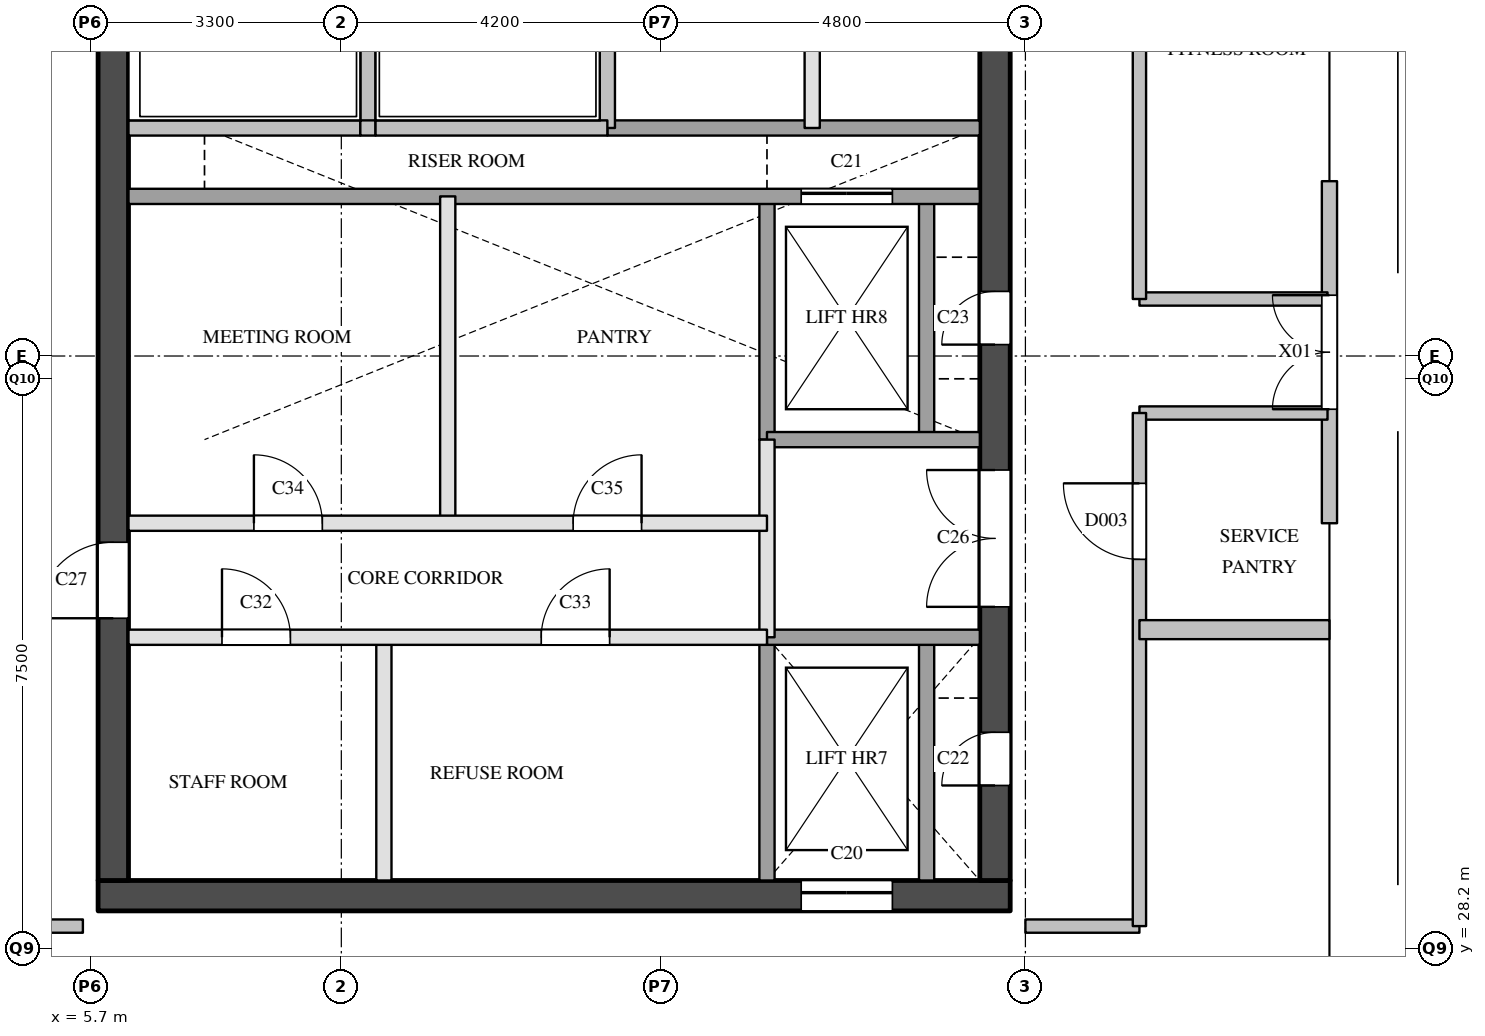
"""IFC4 building model, lengths in metres.
Left out: names, types, materials, properties, quantities, classifications, styles, units other than length and angle.
Written with IfcOpenShell. Run it as: python <this file> out.ifc"""

import sys

from ifc_helpers import new_model, si_unit, direction, frame, frame_2d, origin, place, context, subcontext, project, spatial, rectangle, extrude, element, fill, save


model = new_model("IFC4")
c1 = context("Model", 3, precision=1e-05, world=origin(), true_north=direction((0.0, 1.0)))
c2 = subcontext(c1, "Body", "Model", "MODEL_VIEW")
j1 = project(units=[si_unit("LENGTHUNIT", "METRE"), si_unit("PLANEANGLEUNIT", "RADIAN")], contexts=[c1])
p1 = place(None, origin())
s1 = spatial("IfcSite", under=j1, at=p1, CompositionType="ELEMENT")
p2 = place(p1, origin())
s2 = spatial("IfcBuilding", under=s1, at=p2, CompositionType="ELEMENT")
p3 = place(p2, frame((0.0, 0.0, 203.3)))
s3 = spatial("IfcBuildingStorey", under=s2, at=p3, CompositionType="ELEMENT", Elevation=203.3)
p4 = place(p3, frame((22.0, 33.8, 0.0), z_axis=(0.0, 0.0, 1.0), x_axis=(0.0, 1.0, 0.0)))
e1 = element("IfcWall", 1, at=p4, inside=s3, PredefinedType="SOLIDWALL", context=c2, shape_type="SweptSolid", body=[
    extrude(rectangle(XDim=4.5, YDim=0.2, at=frame_2d((2.25, 0.0))), origin(), (0.0, 0.0, 1.0), 2.6),
])
p5 = place(p4, frame((1.5, 0.0, 0.0)))
e2 = element("IfcOpeningElement", 2, at=p5, cuts=e1, PredefinedType="OPENING", context=c2, shape_type="SweptSolid", body=[
    extrude(rectangle(XDim=1.5, YDim=2.1, at=frame_2d((0.75, 1.05))), frame((0.0, 0.11, 0.0), z_axis=(0.0, -1.0, 0.0), x_axis=(1.0, 0.0, 0.0)), (0.0, 0.0, 1.0), 0.22),
])
p6 = place(p3, frame((5.8, 28.9, 0.0), z_axis=(0.0, 0.0, 1.0), x_axis=(1.0, 0.0, 0.0)))
e3 = element("IfcWall", 3, at=p6, inside=s3, PredefinedType="SHEAR", context=c2, shape_type="SweptSolid", body=[
    extrude(rectangle(XDim=12.0, YDim=0.4, at=frame_2d((6.0, 0.0))), origin(), (0.0, 0.0, 1.0), 3.6),
])
p7 = place(p6, frame((9.25, 0.0, 0.0)))
e4 = element("IfcOpeningElement", 4, at=p7, cuts=e3, PredefinedType="OPENING", context=c2, shape_type="SweptSolid", body=[
    extrude(rectangle(XDim=1.2, YDim=2.1, at=frame_2d((0.6, 1.05))), frame((0.0, 0.21, 0.0), z_axis=(0.0, -1.0, 0.0), x_axis=(1.0, 0.0, 0.0)), (0.0, 0.0, 1.0), 0.42),
])
p8 = place(p3, frame((6.0, 29.1, 0.0), z_axis=(0.0, 0.0, 1.0), x_axis=(0.0, 1.0, 0.0)))
e5 = element("IfcWall", 5, at=p8, inside=s3, PredefinedType="SHEAR", context=c2, shape_type="SweptSolid", body=[
    extrude(rectangle(XDim=20.3, YDim=0.4, at=frame_2d((10.15, 0.0))), origin(), (0.0, 0.0, 1.0), 3.6),
])
p9 = place(p8, frame((3.45, 0.0, 0.0)))
e6 = element("IfcOpeningElement", 6, at=p9, cuts=e5, PredefinedType="OPENING", context=c2, shape_type="SweptSolid", body=[
    extrude(rectangle(XDim=1.0, YDim=2.1, at=frame_2d((0.5, 1.05))), frame((0.0, 0.21, 0.0), z_axis=(0.0, -1.0, 0.0), x_axis=(1.0, 0.0, 0.0)), (0.0, 0.0, 1.0), 0.42),
])
p10 = place(p8, frame((16.4, 0.0, 0.0)))
e7 = element("IfcOpeningElement", 7, at=p10, cuts=e5, PredefinedType="OPENING", context=c2, shape_type="SweptSolid", body=[
    extrude(rectangle(XDim=1.0, YDim=2.1, at=frame_2d((0.5, 1.05))), frame((0.0, 0.21, 0.0), z_axis=(0.0, -1.0, 0.0), x_axis=(1.0, 0.0, 0.0)), (0.0, 0.0, 1.0), 0.42),
])
p11 = place(p3, frame((17.6, 29.1, 0.0), z_axis=(0.0, 0.0, 1.0), x_axis=(0.0, 1.0, 0.0)))
e8 = element("IfcWall", 8, at=p11, inside=s3, PredefinedType="SHEAR", context=c2, shape_type="SweptSolid", body=[
    extrude(rectangle(XDim=20.3, YDim=0.4, at=frame_2d((10.15, 0.0))), origin(), (0.0, 0.0, 1.0), 3.6),
])
p12 = place(p11, frame((1.25, 0.0, 0.0)))
e9 = element("IfcOpeningElement", 9, at=p12, cuts=e8, PredefinedType="OPENING", context=c2, shape_type="SweptSolid", body=[
    extrude(rectangle(XDim=0.7, YDim=2.1, at=frame_2d((0.35, 1.05))), frame((0.0, 0.21, 0.0), z_axis=(0.0, -1.0, 0.0), x_axis=(1.0, 0.0, 0.0)), (0.0, 0.0, 1.0), 0.42),
])
p13 = place(p11, frame((7.05, 0.0, 0.0)))
e10 = element("IfcOpeningElement", 10, at=p13, cuts=e8, PredefinedType="OPENING", context=c2, shape_type="SweptSolid", body=[
    extrude(rectangle(XDim=0.7, YDim=2.1, at=frame_2d((0.35, 1.05))), frame((0.0, 0.21, 0.0), z_axis=(0.0, -1.0, 0.0), x_axis=(1.0, 0.0, 0.0)), (0.0, 0.0, 1.0), 0.42),
])
p14 = place(p11, frame((3.6, 0.0, 0.0)))
e11 = element("IfcOpeningElement", 11, at=p14, cuts=e8, PredefinedType="OPENING", context=c2, shape_type="SweptSolid", body=[
    extrude(rectangle(XDim=1.8, YDim=2.1, at=frame_2d((0.9, 1.05))), frame((0.0, 0.21, 0.0), z_axis=(0.0, -1.0, 0.0), x_axis=(1.0, 0.0, 0.0)), (0.0, 0.0, 1.0), 0.42),
])
p15 = place(p3, frame((9.35, 39.0, 0.0), z_axis=(0.0, 0.0, 1.0), x_axis=(0.0, 1.0, 0.0)))
e12 = element("IfcWall", 12, at=p15, inside=s3, PredefinedType="SOLIDWALL", context=c2, shape_type="SweptSolid", body=[
    extrude(rectangle(XDim=1.9, YDim=0.2, at=frame_2d((0.95, 0.0))), origin(), (0.0, 0.0, 1.0), 3.6),
])
p16 = place(p3, frame((9.56, 29.1, 0.0), z_axis=(0.0, 0.0, 1.0), x_axis=(0.0, 1.0, 0.0)))
e13 = element("IfcWall", 13, at=p16, inside=s3, PredefinedType="PARTITIONING", context=c2, shape_type="SweptSolid", body=[
    extrude(rectangle(XDim=3.2, YDim=0.2, at=frame_2d((1.6, 0.0))), origin(), (0.0, 0.0, 1.0), 3.6),
])
p17 = place(p3, frame((10.4, 33.8, 0.0), z_axis=(0.0, 0.0, 1.0), x_axis=(0.0, 1.0, 0.0)))
e14 = element("IfcWall", 14, at=p17, inside=s3, PredefinedType="PARTITIONING", context=c2, shape_type="SweptSolid", body=[
    extrude(rectangle(XDim=4.3, YDim=0.2, at=frame_2d((2.15, 0.0))), origin(), (0.0, 0.0, 1.0), 3.6),
])
p18 = place(p3, frame((12.5, 39.0, 0.0), z_axis=(0.0, 0.0, 1.0), x_axis=(0.0, 1.0, 0.0)))
e15 = element("IfcWall", 15, at=p18, inside=s3, PredefinedType="SOLIDWALL", context=c2, shape_type="SweptSolid", body=[
    extrude(rectangle(XDim=1.9, YDim=0.2, at=frame_2d((0.95, 0.0))), origin(), (0.0, 0.0, 1.0), 3.6),
])
p19 = place(p3, frame((14.6, 32.3, 0.0), z_axis=(0.0, 0.0, 1.0), x_axis=(0.0, 1.0, 0.0)))
e16 = element("IfcWall", 16, at=p19, inside=s3, PredefinedType="PARTITIONING", context=c2, shape_type="SweptSolid", body=[
    extrude(rectangle(XDim=2.6, YDim=0.2, at=frame_2d((1.3, 0.0))), origin(), (0.0, 0.0, 1.0), 3.6),
])
p20 = place(p3, frame((14.6, 29.1, 0.0), z_axis=(0.0, 0.0, 1.0), x_axis=(0.0, 1.0, 0.0)))
e17 = element("IfcWall", 17, at=p20, inside=s3, PredefinedType="SOLIDWALL", context=c2, shape_type="SweptSolid", body=[
    extrude(rectangle(XDim=3.2, YDim=0.2, at=frame_2d((1.6, 0.0))), origin(), (0.0, 0.0, 1.0), 3.6),
])
p21 = place(p3, frame((14.6, 34.9, 0.0), z_axis=(0.0, 0.0, 1.0), x_axis=(0.0, 1.0, 0.0)))
e18 = element("IfcWall", 18, at=p21, inside=s3, PredefinedType="SOLIDWALL", context=c2, shape_type="SweptSolid", body=[
    extrude(rectangle(XDim=3.2, YDim=0.2, at=frame_2d((1.6, 0.0))), origin(), (0.0, 0.0, 1.0), 3.6),
])
p22 = place(p3, frame((15.195, 39.0, 0.0), z_axis=(0.0, 0.0, 1.0), x_axis=(0.0, 1.0, 0.0)))
e19 = element("IfcWall", 19, at=p22, inside=s3, PredefinedType="PARTITIONING", context=c2, shape_type="SweptSolid", body=[
    extrude(rectangle(XDim=6.2, YDim=0.2, at=frame_2d((3.1, 0.0))), origin(), (0.0, 0.0, 1.0), 3.6),
])
p23 = place(p3, frame((16.7, 29.1, 0.0), z_axis=(0.0, 0.0, 1.0), x_axis=(0.0, 1.0, 0.0)))
e20 = element("IfcWall", 20, at=p23, inside=s3, PredefinedType="SOLIDWALL", context=c2, shape_type="SweptSolid", body=[
    extrude(rectangle(XDim=3.2, YDim=0.2, at=frame_2d((1.6, 0.0))), origin(), (0.0, 0.0, 1.0), 3.6),
])
p24 = place(p3, frame((16.7, 34.9, 0.0), z_axis=(0.0, 0.0, 1.0), x_axis=(0.0, 1.0, 0.0)))
e21 = element("IfcWall", 21, at=p24, inside=s3, PredefinedType="SOLIDWALL", context=c2, shape_type="SweptSolid", body=[
    extrude(rectangle(XDim=3.2, YDim=0.2, at=frame_2d((1.6, 0.0))), origin(), (0.0, 0.0, 1.0), 3.6),
])
p25 = place(p3, frame((6.2, 32.3, 0.0), z_axis=(0.0, 0.0, 1.0), x_axis=(1.0, 0.0, 0.0)))
e22 = element("IfcWall", 22, at=p25, inside=s3, PredefinedType="PARTITIONING", context=c2, shape_type="SweptSolid", body=[
    extrude(rectangle(XDim=8.4, YDim=0.2, at=frame_2d((4.2, 0.0))), origin(), (0.0, 0.0, 1.0), 3.6),
])
p26 = place(p25, frame((1.23, 0.0, 0.0)))
e23 = element("IfcOpeningElement", 23, at=p26, cuts=e22, PredefinedType="OPENING", context=c2, shape_type="SweptSolid", body=[
    extrude(rectangle(XDim=0.9, YDim=2.1, at=frame_2d((0.45, 1.05))), frame((0.0, 0.11, 0.0), z_axis=(0.0, -1.0, 0.0), x_axis=(1.0, 0.0, 0.0)), (0.0, 0.0, 1.0), 0.22),
])
p27 = place(p25, frame((5.43, 0.0, 0.0)))
e24 = element("IfcOpeningElement", 24, at=p27, cuts=e22, PredefinedType="OPENING", context=c2, shape_type="SweptSolid", body=[
    extrude(rectangle(XDim=0.9, YDim=2.1, at=frame_2d((0.45, 1.05))), frame((0.0, 0.11, 0.0), z_axis=(0.0, -1.0, 0.0), x_axis=(1.0, 0.0, 0.0)), (0.0, 0.0, 1.0), 0.22),
])
p28 = place(p3, frame((14.6, 32.3, 0.0), z_axis=(0.0, 0.0, 1.0), x_axis=(1.0, 0.0, 0.0)))
e25 = element("IfcWall", 25, at=p28, inside=s3, PredefinedType="SOLIDWALL", context=c2, shape_type="SweptSolid", body=[
    extrude(rectangle(XDim=2.8, YDim=0.2, at=frame_2d((1.4, 0.0))), origin(), (0.0, 0.0, 1.0), 3.6),
])
p29 = place(p3, frame((6.2, 33.8, 0.0), z_axis=(0.0, 0.0, 1.0), x_axis=(1.0, 0.0, 0.0)))
e26 = element("IfcWall", 26, at=p29, inside=s3, PredefinedType="PARTITIONING", context=c2, shape_type="SweptSolid", body=[
    extrude(rectangle(XDim=8.4, YDim=0.2, at=frame_2d((4.2, 0.0))), origin(), (0.0, 0.0, 1.0), 3.6),
])
p30 = place(p29, frame((1.65, 0.0, 0.0)))
e27 = element("IfcOpeningElement", 27, at=p30, cuts=e26, PredefinedType="OPENING", context=c2, shape_type="SweptSolid", body=[
    extrude(rectangle(XDim=0.9, YDim=2.1, at=frame_2d((0.45, 1.05))), frame((0.0, 0.11, 0.0), z_axis=(0.0, -1.0, 0.0), x_axis=(1.0, 0.0, 0.0)), (0.0, 0.0, 1.0), 0.22),
])
p31 = place(p29, frame((5.85, 0.0, 0.0)))
e28 = element("IfcOpeningElement", 28, at=p31, cuts=e26, PredefinedType="OPENING", context=c2, shape_type="SweptSolid", body=[
    extrude(rectangle(XDim=0.9, YDim=2.1, at=frame_2d((0.45, 1.05))), frame((0.0, 0.11, 0.0), z_axis=(0.0, -1.0, 0.0), x_axis=(1.0, 0.0, 0.0)), (0.0, 0.0, 1.0), 0.22),
])
p32 = place(p3, frame((14.6, 34.9, 0.0), z_axis=(0.0, 0.0, 1.0), x_axis=(1.0, 0.0, 0.0)))
e29 = element("IfcWall", 29, at=p32, inside=s3, PredefinedType="SOLIDWALL", context=c2, shape_type="SweptSolid", body=[
    extrude(rectangle(XDim=2.8, YDim=0.2, at=frame_2d((1.4, 0.0))), origin(), (0.0, 0.0, 1.0), 3.6),
])
p33 = place(p3, frame((6.2, 38.1, 0.0), z_axis=(0.0, 0.0, 1.0), x_axis=(1.0, 0.0, 0.0)))
e30 = element("IfcWall", 30, at=p33, inside=s3, PredefinedType="SOLIDWALL", context=c2, shape_type="SweptSolid", body=[
    extrude(rectangle(XDim=11.2, YDim=0.2, at=frame_2d((5.6, 0.0))), origin(), (0.0, 0.0, 1.0), 3.6),
])
p34 = place(p33, frame((8.85, 0.0, 0.0)))
e31 = element("IfcOpeningElement", 31, at=p34, cuts=e30, PredefinedType="OPENING", context=c2, shape_type="SweptSolid", body=[
    extrude(rectangle(XDim=1.2, YDim=2.1, at=frame_2d((0.6, 1.05))), frame((0.0, 0.11, 0.0), z_axis=(0.0, -1.0, 0.0), x_axis=(1.0, 0.0, 0.0)), (0.0, 0.0, 1.0), 0.22),
])
p35 = place(p3, frame((12.5, 39.0, 0.0), z_axis=(0.0, 0.0, 1.0), x_axis=(1.0, 0.0, 0.0)))
e32 = element("IfcWall", 32, at=p35, inside=s3, PredefinedType="SOLIDWALL", context=c2, shape_type="SweptSolid", body=[
    extrude(rectangle(XDim=4.9, YDim=0.2, at=frame_2d((2.45, 0.0))), origin(), (0.0, 0.0, 1.0), 3.6),
])
p36 = place(p3, frame((6.2, 39.0, 0.0), z_axis=(0.0, 0.0, 1.0), x_axis=(1.0, 0.0, 0.0)))
e33 = element("IfcWall", 33, at=p36, inside=s3, PredefinedType="SOLIDWALL", context=c2, shape_type="SweptSolid", body=[
    extrude(rectangle(XDim=3.05, YDim=0.2, at=frame_2d((1.525, 0.0))), origin(), (0.0, 0.0, 1.0), 3.6),
])
p37 = place(p3, frame((9.25, 39.0, 0.0), z_axis=(0.0, 0.0, 1.0), x_axis=(1.0, 0.0, 0.0)))
e34 = element("IfcWall", 34, at=p37, inside=s3, PredefinedType="SOLIDWALL", context=c2, shape_type="SweptSolid", body=[
    extrude(rectangle(XDim=0.2, YDim=0.2, at=frame_2d((0.1, 0.0))), origin(), (0.0, 0.0, 1.0), 3.6),
])
p38 = place(p3, frame((9.45, 39.0, 0.0), z_axis=(0.0, 0.0, 1.0), x_axis=(1.0, 0.0, 0.0)))
e35 = element("IfcWall", 35, at=p38, inside=s3, PredefinedType="SOLIDWALL", context=c2, shape_type="SweptSolid", body=[
    extrude(rectangle(XDim=3.05, YDim=0.2, at=frame_2d((1.525, 0.0))), origin(), (0.0, 0.0, 1.0), 3.6),
])
for number, where, z_axis, x_axis in (
    (36, (4.1, 28.5, 0.0), (0.0, 0.0, 1.0), (1.0, 0.0, 0.0)),
    (37, (18.0, 28.5, 0.0), (0.0, 0.0, 1.0), (1.0, 0.0, 0.0)),
):
    element("IfcWall", number, at=place(p3, frame(where, z_axis=z_axis, x_axis=x_axis)), inside=s3, PredefinedType="PARTITIONING", context=c2, shape_type="SweptSolid", body=[
        extrude(rectangle(XDim=1.5, YDim=0.175, at=frame_2d((0.75, 0.0))), origin(), (0.0, 0.0, 1.0), 3.6),
    ])
for number, where, z_axis, x_axis in (
    (38, (19.5, 35.25, 0.0), (0.0, 0.0, 1.0), (1.0, 0.0, 0.0)),
    (39, (19.5, 36.75, 0.0), (0.0, 0.0, 1.0), (1.0, 0.0, 0.0)),
):
    element("IfcWall", number, at=place(p3, frame(where, z_axis=z_axis, x_axis=x_axis)), inside=s3, PredefinedType="PARTITIONING", context=c2, shape_type="SweptSolid", body=[
        extrude(rectangle(XDim=2.475, YDim=0.175, at=frame_2d((1.237, 0.0))), origin(), (0.0, 0.0, 1.0), 3.6),
    ])
p39 = place(p3, frame((19.5, 28.5, 0.0), z_axis=(0.0, 0.0, 1.0), x_axis=(0.0, 1.0, 0.0)))
e40 = element("IfcWall", 40, at=p39, inside=s3, PredefinedType="PARTITIONING", context=c2, shape_type="SweptSolid", body=[
    extrude(rectangle(XDim=6.75, YDim=0.175, at=frame_2d((3.375, 0.0))), origin(), (0.0, 0.0, 1.0), 3.6),
])
p40 = place(p39, frame((4.825, 0.0, 0.0)))
e41 = element("IfcOpeningElement", 41, at=p40, cuts=e40, PredefinedType="OPENING", context=c2, shape_type="SweptSolid", body=[
    extrude(rectangle(XDim=1.0, YDim=2.1, at=frame_2d((0.5, 1.05))), frame((0.0, 0.097, 0.0), z_axis=(0.0, -1.0, 0.0), x_axis=(1.0, 0.0, 0.0)), (0.0, 0.0, 1.0), 0.195),
])
p41 = place(p3, frame((19.5, 36.75, 0.0), z_axis=(0.0, 0.0, 1.0), x_axis=(0.0, 1.0, 0.0)))
e42 = element("IfcWall", 42, at=p41, inside=s3, PredefinedType="PARTITIONING", context=c2, shape_type="SweptSolid", body=[
    extrude(rectangle(XDim=14.75, YDim=0.175, at=frame_2d((7.375, 0.0))), origin(), (0.0, 0.0, 1.0), 3.6),
])
p42 = place(p41, frame((5.239, 0.0, 0.0)))
e43 = element("IfcOpeningElement", 43, at=p42, cuts=e42, PredefinedType="OPENING", context=c2, shape_type="SweptSolid", body=[
    extrude(rectangle(XDim=0.9, YDim=2.1, at=frame_2d((0.45, 1.05))), frame((0.0, 0.097, 0.0), z_axis=(0.0, -1.0, 0.0), x_axis=(1.0, 0.0, 0.0)), (0.0, 0.0, 1.0), 0.195),
])
p43 = place(p3, frame((19.5, 32.4, 0.0), z_axis=(0.0, 0.0, 1.0), x_axis=(1.0, 0.0, 0.0)))
e44 = element("IfcWall", 44, at=p43, inside=s3, PredefinedType="PARTITIONING", context=c2, shape_type="SweptSolid", body=[
    extrude(rectangle(XDim=2.5, YDim=0.25, at=frame_2d((1.25, 0.0))), origin(), (0.0, 0.0, 1.0), 3.6),
])
p44 = place(p5, origin())
e45 = element("IfcDoor", 45, at=p44, inside=s3, OperationType="DOUBLE_DOOR_SINGLE_SWING", PredefinedType="DOOR", context=c2, shape_type="SweptSolid", body=[
    extrude(rectangle(XDim=1.5, YDim=2.1, at=frame_2d((0.75, 1.05))), frame((0.0, 0.025, 0.0), z_axis=(0.0, -1.0, 0.0), x_axis=(1.0, 0.0, 0.0)), (0.0, 0.0, 1.0), 0.05),
])
fill(e2, e45)
p45 = place(p7, origin())
e46 = element("IfcDoor", 46, at=p45, inside=s3, OperationType="SLIDING_TO_LEFT", PredefinedType="DOOR", context=c2, shape_type="SweptSolid", body=[
    extrude(rectangle(XDim=1.2, YDim=2.1, at=frame_2d((0.6, 1.05))), frame((0.0, 0.025, 0.0), z_axis=(0.0, -1.0, 0.0), x_axis=(1.0, 0.0, 0.0)), (0.0, 0.0, 1.0), 0.05),
])
fill(e4, e46)
p46 = place(p34, origin())
e47 = element("IfcDoor", 47, at=p46, inside=s3, OperationType="SLIDING_TO_LEFT", PredefinedType="DOOR", context=c2, shape_type="SweptSolid", body=[
    extrude(rectangle(XDim=1.2, YDim=2.1, at=frame_2d((0.6, 1.05))), frame((0.0, 0.025, 0.0), z_axis=(0.0, -1.0, 0.0), x_axis=(1.0, 0.0, 0.0)), (0.0, 0.0, 1.0), 0.05),
])
fill(e31, e47)
p47 = place(p12, origin())
e48 = element("IfcDoor", 48, at=p47, inside=s3, OperationType="SINGLE_SWING_LEFT", PredefinedType="DOOR", context=c2, shape_type="SweptSolid", body=[
    extrude(rectangle(XDim=0.7, YDim=2.1, at=frame_2d((0.35, 1.05))), frame((0.0, 0.025, 0.0), z_axis=(0.0, -1.0, 0.0), x_axis=(1.0, 0.0, 0.0)), (0.0, 0.0, 1.0), 0.05),
])
fill(e9, e48)
p48 = place(p13, origin())
e49 = element("IfcDoor", 49, at=p48, inside=s3, OperationType="SINGLE_SWING_LEFT", PredefinedType="DOOR", context=c2, shape_type="SweptSolid", body=[
    extrude(rectangle(XDim=0.7, YDim=2.1, at=frame_2d((0.35, 1.05))), frame((0.0, 0.025, 0.0), z_axis=(0.0, -1.0, 0.0), x_axis=(1.0, 0.0, 0.0)), (0.0, 0.0, 1.0), 0.05),
])
fill(e10, e49)
p49 = place(p14, origin())
e50 = element("IfcDoor", 50, at=p49, inside=s3, OperationType="DOUBLE_DOOR_SINGLE_SWING", PredefinedType="DOOR", context=c2, shape_type="SweptSolid", body=[
    extrude(rectangle(XDim=1.8, YDim=2.1, at=frame_2d((0.9, 1.05))), frame((0.0, 0.025, 0.0), z_axis=(0.0, -1.0, 0.0), x_axis=(1.0, 0.0, 0.0)), (0.0, 0.0, 1.0), 0.05),
])
fill(e11, e50)
p50 = place(p9, origin())
e51 = element("IfcDoor", 51, at=p50, inside=s3, OperationType="SINGLE_SWING_LEFT", PredefinedType="DOOR", context=c2, shape_type="SweptSolid", body=[
    extrude(rectangle(XDim=1.0, YDim=2.1, at=frame_2d((0.5, 1.05))), frame((0.0, 0.025, 0.0), z_axis=(0.0, -1.0, 0.0), x_axis=(1.0, 0.0, 0.0)), (0.0, 0.0, 1.0), 0.05),
])
fill(e6, e51)
p51 = place(p26, origin())
e52 = element("IfcDoor", 52, at=p51, inside=s3, OperationType="SINGLE_SWING_LEFT", PredefinedType="DOOR", context=c2, shape_type="SweptSolid", body=[
    extrude(rectangle(XDim=0.9, YDim=2.1, at=frame_2d((0.45, 1.05))), frame((0.0, 0.025, 0.0), z_axis=(0.0, -1.0, 0.0), x_axis=(1.0, 0.0, 0.0)), (0.0, 0.0, 1.0), 0.05),
])
fill(e23, e52)
p52 = place(p27, origin())
e53 = element("IfcDoor", 53, at=p52, inside=s3, OperationType="SINGLE_SWING_RIGHT", PredefinedType="DOOR", context=c2, shape_type="SweptSolid", body=[
    extrude(rectangle(XDim=0.9, YDim=2.1, at=frame_2d((0.45, 1.05))), frame((0.0, 0.025, 0.0), z_axis=(0.0, -1.0, 0.0), x_axis=(1.0, 0.0, 0.0)), (0.0, 0.0, 1.0), 0.05),
])
fill(e24, e53)
p53 = place(p30, origin())
e54 = element("IfcDoor", 54, at=p53, inside=s3, OperationType="SINGLE_SWING_LEFT", PredefinedType="DOOR", context=c2, shape_type="SweptSolid", body=[
    extrude(rectangle(XDim=0.9, YDim=2.1, at=frame_2d((0.45, 1.05))), frame((0.0, 0.025, 0.0), z_axis=(0.0, -1.0, 0.0), x_axis=(1.0, 0.0, 0.0)), (0.0, 0.0, 1.0), 0.05),
])
fill(e27, e54)
p54 = place(p31, origin())
e55 = element("IfcDoor", 55, at=p54, inside=s3, OperationType="SINGLE_SWING_RIGHT", PredefinedType="DOOR", context=c2, shape_type="SweptSolid", body=[
    extrude(rectangle(XDim=0.9, YDim=2.1, at=frame_2d((0.45, 1.05))), frame((0.0, 0.025, 0.0), z_axis=(0.0, -1.0, 0.0), x_axis=(1.0, 0.0, 0.0)), (0.0, 0.0, 1.0), 0.05),
])
fill(e28, e55)
p55 = place(p40, origin())
e56 = element("IfcDoor", 56, at=p55, inside=s3, OperationType="SINGLE_SWING_RIGHT", PredefinedType="DOOR", context=c2, shape_type="SweptSolid", body=[
    extrude(rectangle(XDim=1.0, YDim=2.1, at=frame_2d((0.5, 1.05))), frame((0.0, 0.025, 0.0), z_axis=(0.0, -1.0, 0.0), x_axis=(1.0, 0.0, 0.0)), (0.0, 0.0, 1.0), 0.05),
])
fill(e41, e56)
save(model, sys.argv[1])
